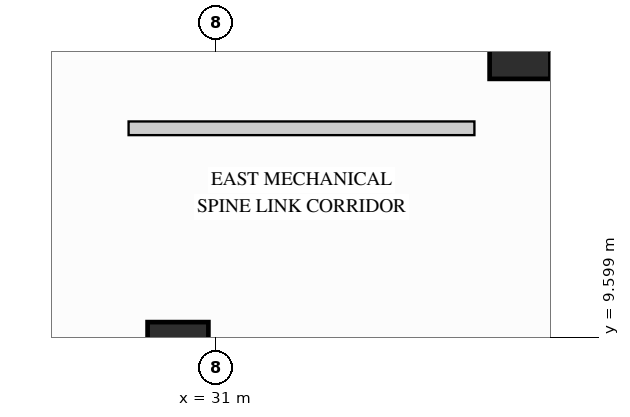
"""IFC4 building model, lengths in metres.
Left out: names, types, materials, properties, quantities, classifications, styles, units other than length and angle.
Written with IfcOpenShell. Run it as: python <this file> out.ifc"""

import sys

from ifc_helpers import new_model, si_unit, direction, frame, frame_2d, origin, origin_2d, place, context, subcontext, project, spatial, rectangle, extrude, source, transform, mapped, element, save


model = new_model("IFC4")
c1 = context("Model", 3, precision=1e-05, world=origin(), true_north=direction((0.0, 1.0)))
c2 = subcontext(c1, "Body", "Model", "MODEL_VIEW")
j1 = project(units=[si_unit("LENGTHUNIT", "METRE"), si_unit("PLANEANGLEUNIT", "RADIAN")], contexts=[c1])
p1 = place(None, origin())
s1 = spatial("IfcSite", under=j1, at=p1, CompositionType="ELEMENT")
p2 = place(p1, origin())
s2 = spatial("IfcBuilding", under=s1, at=p2, CompositionType="ELEMENT")
p3 = place(p2, frame((0.0, 0.0, 207.9)))
s3 = spatial("IfcBuildingStorey", under=s2, at=p3, CompositionType="ELEMENT", Elevation=207.9)
m1 = source(origin(), c2, "Body", "SweptSolid", [
    extrude(rectangle(XDim=0.8, YDim=1.0, at=origin_2d()), origin(), (0.0, 0.0, 1.0), 4.26),
])
for number, where, z_axis, x_axis in (
    (1, (35.0, 13.5, 0.0), (0.0, 0.0, 1.0), (1.0, 0.0, 0.0)),
    (2, (30.5, 9.3, 0.0), (0.0, 0.0, 1.0), (1.0, 0.0, 0.0)),
):
    element("IfcColumn", number, at=place(p3, frame(where, z_axis=z_axis, x_axis=x_axis)), inside=s3, PredefinedType="COLUMN", context=c2, shape_type="MappedRepresentation", body=[
        mapped(m1, transform((0.0, 0.0, 0.0), x_axis=(1.0, 0.0, 0.0), y_axis=(0.0, 1.0, 0.0), z_axis=(0.0, 0.0, 1.0))),
    ])
m2 = source(origin(), c2, "Body", "SweptSolid", [
    extrude(rectangle(XDim=4.55, YDim=0.18, at=frame_2d((2.275, 0.0))), origin(), (0.0, 0.0, 1.0), 4.245),
])
p4 = place(p3, frame((29.85, 12.35, 0.0), z_axis=(0.0, 0.0, 1.0), x_axis=(1.0, 0.0, 0.0)))
e3 = element("IfcWall", 3, at=p4, inside=s3, PredefinedType="PARTITIONING", context=c2, shape_type="MappedRepresentation", body=[
    mapped(m2, transform((0.0, 0.0, 0.0), x_axis=(1.0, 0.0, 0.0), y_axis=(0.0, 1.0, 0.0), z_axis=(0.0, 0.0, 1.0))),
])
save(model, sys.argv[1])
